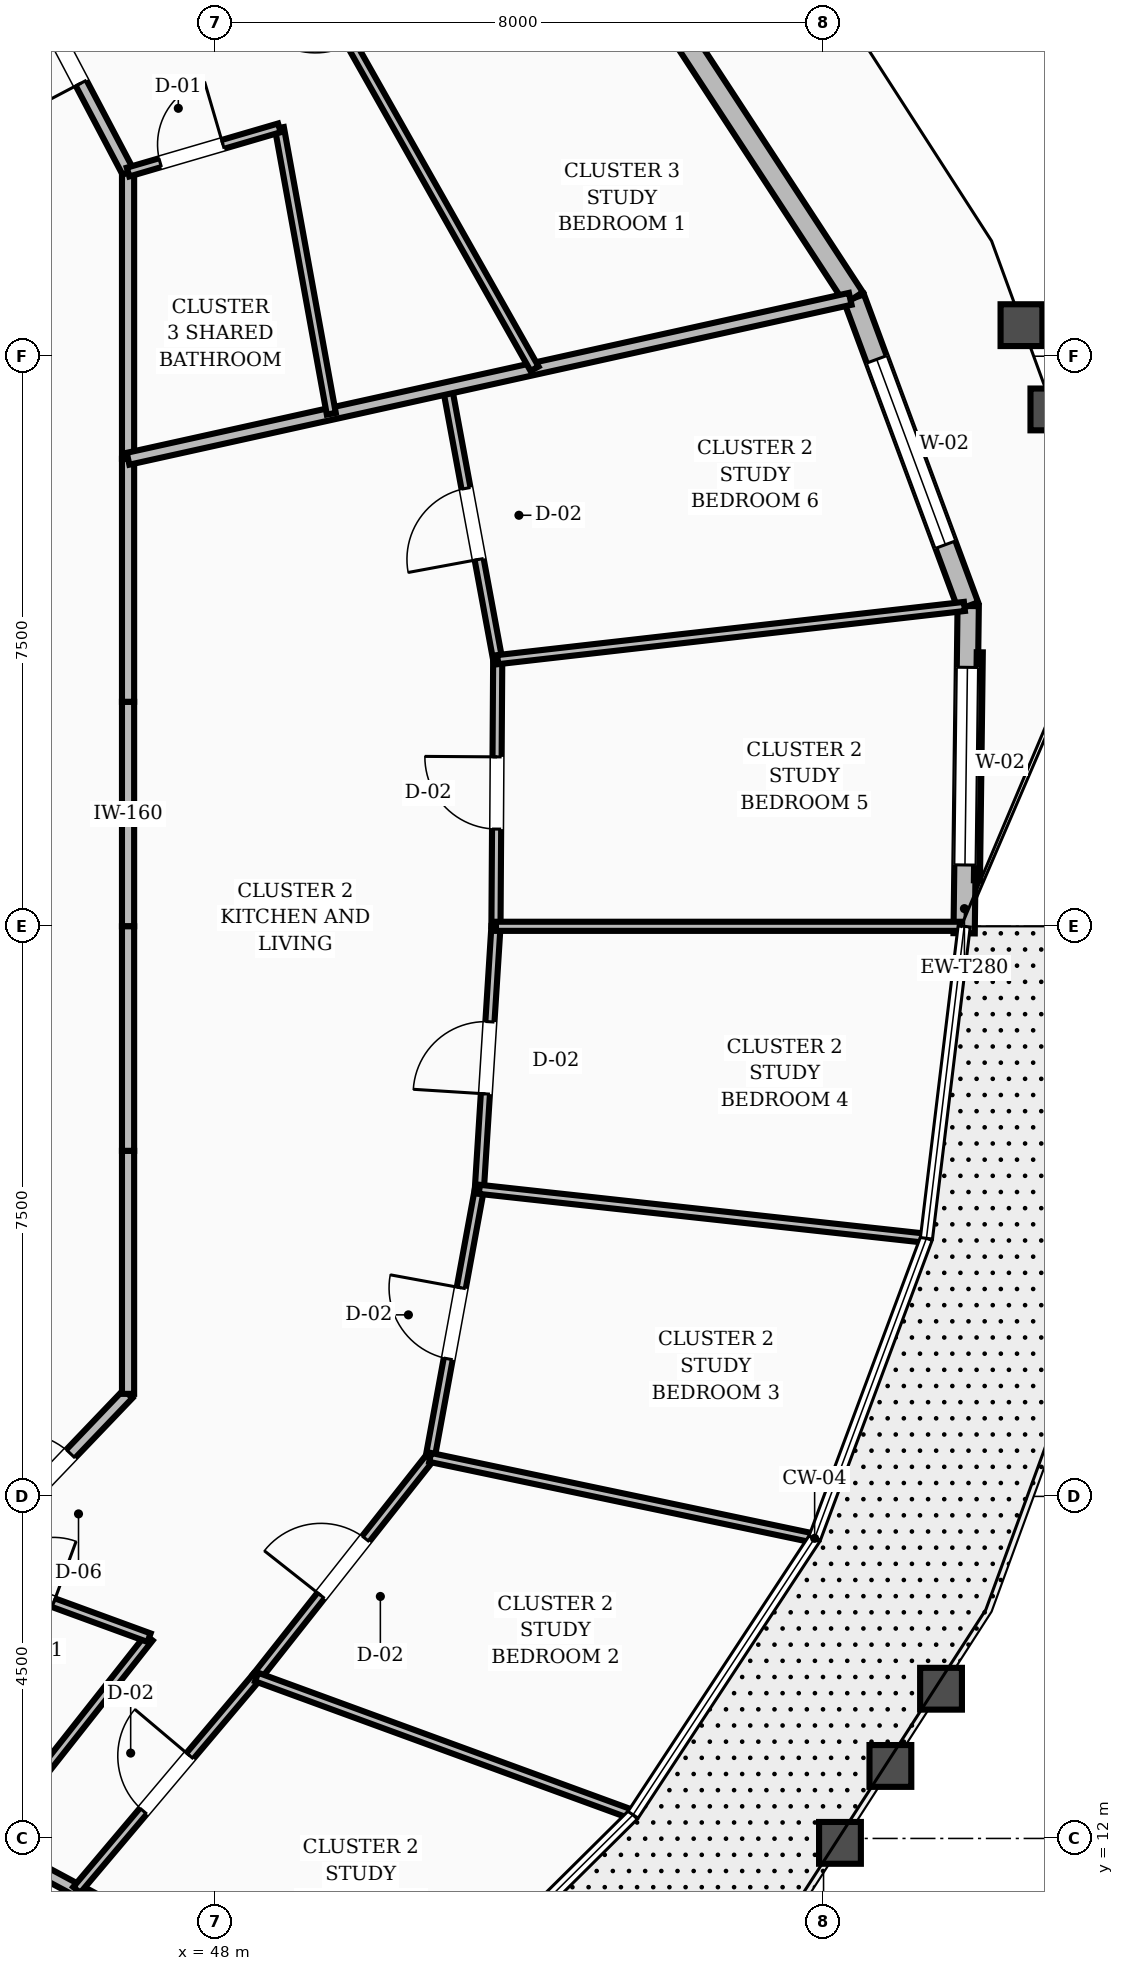
"""IFC4 building model, lengths in metres.
Left out: names, types, materials, properties, quantities, classifications, styles, units other than length and angle.
Written with IfcOpenShell. Run it as: python <this file> out.ifc"""

import sys

from ifc_helpers import new_model, si_unit, direction, frame, frame_2d, origin, place, context, subcontext, project, spatial, rectangle, extrude, element, fill, save


model = new_model("IFC4")
c1 = context("Model", 3, precision=1e-05, world=origin(), true_north=direction((0.0, 1.0)))
c2 = subcontext(c1, "Body", "Model", "MODEL_VIEW")
j1 = project(units=[si_unit("LENGTHUNIT", "METRE"), si_unit("PLANEANGLEUNIT", "RADIAN")], contexts=[c1])
p1 = place(None, origin())
s1 = spatial("IfcSite", under=j1, at=p1, CompositionType="ELEMENT")
p2 = place(p1, origin())
s2 = spatial("IfcBuilding", under=s1, at=p2, CompositionType="ELEMENT")
p3 = place(p2, frame((0.0, 0.0, 146.0)))
s3 = spatial("IfcBuildingStorey", under=s2, at=p3, CompositionType="ELEMENT", Elevation=146.0)
p4 = place(p3, frame((57.849, 23.908, 0.0), z_axis=(0.0, 0.0, 1.0), x_axis=(0.012472806403, 0.999922211525, 0.0)))
e1 = element("IfcWall", 1, at=p4, inside=s3, PredefinedType="STANDARD", context=c2, shape_type="SweptSolid", body=[
    extrude(rectangle(XDim=4.306, YDim=0.28, at=frame_2d((2.153, 0.0))), origin(), (0.0, 0.0, 1.0), 2.82),
])
p5 = place(p4, frame((0.899, 0.0, 0.8)))
e2 = element("IfcOpeningElement", 2, at=p5, cuts=e1, PredefinedType="OPENING", context=c2, shape_type="SweptSolid", body=[
    extrude(rectangle(XDim=2.6, YDim=1.65, at=frame_2d((1.3, 0.825))), frame((0.0, 0.15, 0.0), z_axis=(0.0, -1.0, 0.0), x_axis=(1.0, 0.0, 0.0)), (0.0, 0.0, 1.0), 0.3),
])
p6 = place(p3, frame((57.903, 28.214, 0.0), z_axis=(0.0, 0.0, 1.0), x_axis=(-0.347777987911, 0.937576914778, 0.0)))
e3 = element("IfcWall", 3, at=p6, inside=s3, PredefinedType="STANDARD", context=c2, shape_type="SweptSolid", body=[
    extrude(rectangle(XDim=4.322, YDim=0.28, at=frame_2d((2.161, 0.0))), origin(), (0.0, 0.0, 1.0), 2.82),
])
p7 = place(p6, frame((0.861, 0.0, 0.8)))
e4 = element("IfcOpeningElement", 4, at=p7, cuts=e3, PredefinedType="OPENING", context=c2, shape_type="SweptSolid", body=[
    extrude(rectangle(XDim=2.6, YDim=1.65, at=frame_2d((1.3, 0.825))), frame((0.0, 0.15, 0.0), z_axis=(0.0, -1.0, 0.0), x_axis=(1.0, 0.0, 0.0)), (0.0, 0.0, 1.0), 0.3),
])
p8 = place(p3, frame((56.4, 32.266, 0.0), z_axis=(0.0, 0.0, 1.0), x_axis=(-0.547087162156, 0.837075645927, 0.0)))
e5 = element("IfcWall", 5, at=p8, inside=s3, PredefinedType="STANDARD", context=c2, shape_type="SweptSolid", body=[
    extrude(rectangle(XDim=4.461, YDim=0.28, at=frame_2d((2.23, 0.0))), origin(), (0.0, 0.0, 1.0), 2.82),
])
p9 = place(p3, frame((46.85, 24.0, 0.0), z_axis=(0.0, 0.0, 1.0), x_axis=(0.0, 1.0, 0.0)))
e6 = element("IfcWall", 6, at=p9, inside=s3, PredefinedType="SOLIDWALL", context=c2, shape_type="SweptSolid", body=[
    extrude(rectangle(XDim=2.954, YDim=0.16, at=frame_2d((1.477, 0.0))), origin(), (0.0, 0.0, 1.0), 2.8),
])
p10 = place(p3, frame((46.85, 26.954, 0.0), z_axis=(0.0, 0.0, 1.0), x_axis=(0.0, 1.0, 0.0)))
e7 = element("IfcWall", 7, at=p10, inside=s3, PredefinedType="SOLIDWALL", context=c2, shape_type="SweptSolid", body=[
    extrude(rectangle(XDim=3.197, YDim=0.16, at=frame_2d((1.599, 0.0))), origin(), (0.0, 0.0, 1.0), 2.8),
])
p11 = place(p3, frame((46.85, 30.151, 0.0), z_axis=(0.0, 0.0, 1.0), x_axis=(0.0, 1.0, 0.0)))
e8 = element("IfcWall", 8, at=p11, inside=s3, PredefinedType="SOLIDWALL", context=c2, shape_type="SweptSolid", body=[
    extrude(rectangle(XDim=3.771, YDim=0.16, at=frame_2d((1.886, 0.0))), origin(), (0.0, 0.0, 1.0), 2.8),
])
p12 = place(p3, frame((46.85, 33.923, 0.0), z_axis=(0.0, 0.0, 1.0), x_axis=(-0.466093963429, 0.884735224378, 0.0)))
e9 = element("IfcWall", 9, at=p12, inside=s3, PredefinedType="SOLIDWALL", context=c2, shape_type="SweptSolid", body=[
    extrude(rectangle(XDim=3.648, YDim=0.16, at=frame_2d((1.824, 0.0))), origin(), (0.0, 0.0, 1.0), 2.8),
])
p13 = place(p12, frame((1.324, 0.0, 0.0)))
e10 = element("IfcOpeningElement", 10, at=p13, cuts=e9, PredefinedType="OPENING", context=c2, shape_type="SweptSolid", body=[
    extrude(rectangle(XDim=1.0, YDim=2.1, at=frame_2d((0.5, 1.05))), frame((0.0, 0.09, 0.0), z_axis=(0.0, -1.0, 0.0), x_axis=(1.0, 0.0, 0.0)), (0.0, 0.0, 1.0), 0.18),
])
p14 = place(p3, frame((44.65, 15.548, 0.0), z_axis=(0.0, 0.0, 1.0), x_axis=(0.691055487108, 0.722801711216, 0.0)))
e11 = element("IfcWall", 11, at=p14, inside=s3, PredefinedType="SOLIDWALL", context=c2, shape_type="SweptSolid", body=[
    extrude(rectangle(XDim=3.184, YDim=0.16, at=frame_2d((1.592, 0.0))), origin(), (0.0, 0.0, 1.0), 2.8),
])
p15 = place(p14, frame((1.092, 0.0, 0.0)))
e12 = element("IfcOpeningElement", 12, at=p15, cuts=e11, PredefinedType="OPENING", context=c2, shape_type="SweptSolid", body=[
    extrude(rectangle(XDim=1.0, YDim=2.1, at=frame_2d((0.5, 1.05))), frame((0.0, 0.09, 0.0), z_axis=(0.0, -1.0, 0.0), x_axis=(1.0, 0.0, 0.0)), (0.0, 0.0, 1.0), 0.18),
])
p16 = place(p3, frame((46.85, 17.849, 0.0), z_axis=(0.0, 0.0, 1.0), x_axis=(0.0, 1.0, 0.0)))
e13 = element("IfcWall", 13, at=p16, inside=s3, PredefinedType="SOLIDWALL", context=c2, shape_type="SweptSolid", body=[
    extrude(rectangle(XDim=3.197, YDim=0.16, at=frame_2d((1.599, 0.0))), origin(), (0.0, 0.0, 1.0), 2.8),
])
p17 = place(p3, frame((46.85, 21.046, 0.0), z_axis=(0.0, 0.0, 1.0), x_axis=(0.0, 1.0, 0.0)))
e14 = element("IfcWall", 14, at=p17, inside=s3, PredefinedType="SOLIDWALL", context=c2, shape_type="SweptSolid", body=[
    extrude(rectangle(XDim=2.954, YDim=0.16, at=frame_2d((1.477, 0.0))), origin(), (0.0, 0.0, 1.0), 2.8),
])
p18 = place(p3, frame((42.95, 13.05, 0.0), z_axis=(0.0, 0.0, 1.0), x_axis=(0.881439566777, -0.472296824169, 0.0)))
e15 = element("IfcWall", 15, at=p18, inside=s3, PredefinedType="SOLIDWALL", context=c2, shape_type="SweptSolid", body=[
    extrude(rectangle(XDim=8.265, YDim=0.16, at=frame_2d((4.133, 0.0))), origin(), (0.0, 0.0, 1.0), 2.8),
])
p19 = place(p3, frame((45.002, 11.95, 0.0), z_axis=(0.0, 0.0, 1.0), x_axis=(0.619575015098, 0.784937450162, 0.0)))
e16 = element("IfcWall", 16, at=p19, inside=s3, PredefinedType="PARTITIONING", context=c2, shape_type="SweptSolid", body=[
    extrude(rectangle(XDim=3.428, YDim=0.12, at=frame_2d((1.714, 0.0))), origin(), (0.0, 0.0, 1.0), 2.8),
])
p20 = place(p3, frame((44.65, 15.548, 0.0), z_axis=(0.0, 0.0, 1.0), x_axis=(0.93908860173, -0.343675134538, 0.0)))
e17 = element("IfcWall", 17, at=p20, inside=s3, PredefinedType="PARTITIONING", context=c2, shape_type="SweptSolid", body=[
    extrude(rectangle(XDim=2.637, YDim=0.12, at=frame_2d((1.318, 0.0))), origin(), (0.0, 0.0, 1.0), 2.8),
])
p21 = place(p20, frame((0.44, 0.0, 0.0)))
e18 = element("IfcOpeningElement", 18, at=p21, cuts=e17, PredefinedType="OPENING", context=c2, shape_type="SweptSolid", body=[
    extrude(rectangle(XDim=0.86, YDim=2.1, at=frame_2d((0.43, 1.05))), frame((0.0, 0.07, 0.0), z_axis=(0.0, -1.0, 0.0), x_axis=(1.0, 0.0, 0.0)), (0.0, 0.0, 1.0), 0.14),
])
p22 = place(p3, frame((46.175, 11.322, 0.0), z_axis=(0.0, 0.0, 1.0), x_axis=(0.645297395585, 0.763931457169, 0.0)))
e19 = element("IfcWall", 19, at=p22, inside=s3, PredefinedType="PARTITIONING", context=c2, shape_type="SweptSolid", body=[
    extrude(rectangle(XDim=3.667, YDim=0.12, at=frame_2d((1.833, 0.0))), origin(), (0.0, 0.0, 1.0), 2.8),
])
p23 = place(p22, frame((1.359, 0.0, 0.0)))
e20 = element("IfcOpeningElement", 20, at=p23, cuts=e19, PredefinedType="OPENING", context=c2, shape_type="SweptSolid", body=[
    extrude(rectangle(XDim=0.95, YDim=2.1, at=frame_2d((0.475, 1.05))), frame((0.0, 0.07, 0.0), z_axis=(0.0, -1.0, 0.0), x_axis=(1.0, 0.0, 0.0)), (0.0, 0.0, 1.0), 0.14),
])
p24 = place(p3, frame((48.541, 14.124, 0.0), z_axis=(0.0, 0.0, 1.0), x_axis=(0.620026847561, 0.784580593887, 0.0)))
e21 = element("IfcWall", 21, at=p24, inside=s3, PredefinedType="PARTITIONING", context=c2, shape_type="SweptSolid", body=[
    extrude(rectangle(XDim=3.682, YDim=0.12, at=frame_2d((1.841, 0.0))), origin(), (0.0, 0.0, 1.0), 2.8),
])
p25 = place(p24, frame((1.366, 0.0, 0.0)))
e22 = element("IfcOpeningElement", 22, at=p25, cuts=e21, PredefinedType="OPENING", context=c2, shape_type="SweptSolid", body=[
    extrude(rectangle(XDim=0.95, YDim=2.1, at=frame_2d((0.475, 1.05))), frame((0.0, 0.07, 0.0), z_axis=(0.0, -1.0, 0.0), x_axis=(1.0, 0.0, 0.0)), (0.0, 0.0, 1.0), 0.14),
])
p26 = place(p3, frame((48.541, 14.124, 0.0), z_axis=(0.0, 0.0, 1.0), x_axis=(0.939099678482, -0.343644865924, 0.0)))
e23 = element("IfcWall", 23, at=p26, inside=s3, PredefinedType="PARTITIONING", context=c2, shape_type="SweptSolid", body=[
    extrude(rectangle(XDim=5.224, YDim=0.12, at=frame_2d((2.612, 0.0))), origin(), (0.0, 0.0, 1.0), 2.8),
])
p27 = place(p3, frame((50.824, 17.013, 0.0), z_axis=(0.0, 0.0, 1.0), x_axis=(0.180484851733, 0.983577764234, 0.0)))
e24 = element("IfcWall", 24, at=p27, inside=s3, PredefinedType="PARTITIONING", context=c2, shape_type="SweptSolid", body=[
    extrude(rectangle(XDim=3.586, YDim=0.12, at=frame_2d((1.793, 0.0))), origin(), (0.0, 0.0, 1.0), 2.8),
])
p28 = place(p27, frame((1.318, 0.0, 0.0)))
e25 = element("IfcOpeningElement", 25, at=p28, cuts=e24, PredefinedType="OPENING", context=c2, shape_type="SweptSolid", body=[
    extrude(rectangle(XDim=0.95, YDim=2.1, at=frame_2d((0.475, 1.05))), frame((0.0, 0.07, 0.0), z_axis=(0.0, -1.0, 0.0), x_axis=(1.0, 0.0, 0.0)), (0.0, 0.0, 1.0), 0.14),
])
p29 = place(p3, frame((50.824, 17.013, 0.0), z_axis=(0.0, 0.0, 1.0), x_axis=(0.978584181815, -0.2058470284, 0.0)))
e26 = element("IfcWall", 26, at=p29, inside=s3, PredefinedType="PARTITIONING", context=c2, shape_type="SweptSolid", body=[
    extrude(rectangle(XDim=5.119, YDim=0.12, at=frame_2d((2.56, 0.0))), origin(), (0.0, 0.0, 1.0), 2.8),
])
p30 = place(p3, frame((51.472, 20.54, 0.0), z_axis=(0.0, 0.0, 1.0), x_axis=(0.063022706804, 0.998012093327, 0.0)))
e27 = element("IfcWall", 27, at=p30, inside=s3, PredefinedType="PARTITIONING", context=c2, shape_type="SweptSolid", body=[
    extrude(rectangle(XDim=3.467, YDim=0.12, at=frame_2d((1.733, 0.0))), origin(), (0.0, 0.0, 1.0), 2.8),
])
p31 = place(p30, frame((1.259, 0.0, 0.0)))
e28 = element("IfcOpeningElement", 28, at=p31, cuts=e27, PredefinedType="OPENING", context=c2, shape_type="SweptSolid", body=[
    extrude(rectangle(XDim=0.95, YDim=2.1, at=frame_2d((0.475, 1.05))), frame((0.0, 0.07, 0.0), z_axis=(0.0, -1.0, 0.0), x_axis=(1.0, 0.0, 0.0)), (0.0, 0.0, 1.0), 0.14),
])
p32 = place(p3, frame((51.472, 20.54, 0.0), z_axis=(0.0, 0.0, 1.0), x_axis=(0.994053548393, -0.10889234559, 0.0)))
e29 = element("IfcWall", 29, at=p32, inside=s3, PredefinedType="PARTITIONING", context=c2, shape_type="SweptSolid", body=[
    extrude(rectangle(XDim=5.867, YDim=0.12, at=frame_2d((2.934, 0.0))), origin(), (0.0, 0.0, 1.0), 2.8),
])
p33 = place(p3, frame((51.69, 24.0, 0.0), z_axis=(0.0, 0.0, 1.0), x_axis=(0.006610850666, 0.999978148088, 0.0)))
e30 = element("IfcWall", 30, at=p33, inside=s3, PredefinedType="PARTITIONING", context=c2, shape_type="SweptSolid", body=[
    extrude(rectangle(XDim=3.508, YDim=0.12, at=frame_2d((1.754, 0.0))), origin(), (0.0, 0.0, 1.0), 2.8),
])
p34 = place(p33, frame((1.279, 0.0, 0.0)))
e31 = element("IfcOpeningElement", 31, at=p34, cuts=e30, PredefinedType="OPENING", context=c2, shape_type="SweptSolid", body=[
    extrude(rectangle(XDim=0.95, YDim=2.1, at=frame_2d((0.475, 1.05))), frame((0.0, 0.07, 0.0), z_axis=(0.0, -1.0, 0.0), x_axis=(1.0, 0.0, 0.0)), (0.0, 0.0, 1.0), 0.14),
])
p35 = place(p3, frame((51.69, 24.0, 0.0), z_axis=(0.0, 0.0, 1.0), x_axis=(1.0, 0.0, 0.0)))
e32 = element("IfcWall", 32, at=p35, inside=s3, PredefinedType="PARTITIONING", context=c2, shape_type="SweptSolid", body=[
    extrude(rectangle(XDim=6.11, YDim=0.12, at=frame_2d((3.055, 0.0))), origin(), (0.0, 0.0, 1.0), 2.8),
])
p36 = place(p3, frame((51.713, 27.508, 0.0), z_axis=(0.0, 0.0, 1.0), x_axis=(-0.182000245683, 0.983298484984, 0.0)))
e33 = element("IfcWall", 33, at=p36, inside=s3, PredefinedType="PARTITIONING", context=c2, shape_type="SweptSolid", body=[
    extrude(rectangle(XDim=3.634, YDim=0.12, at=frame_2d((1.817, 0.0))), origin(), (0.0, 0.0, 1.0), 2.8),
])
p37 = place(p36, frame((1.342, 0.0, 0.0)))
e34 = element("IfcOpeningElement", 34, at=p37, cuts=e33, PredefinedType="OPENING", context=c2, shape_type="SweptSolid", body=[
    extrude(rectangle(XDim=0.95, YDim=2.1, at=frame_2d((0.475, 1.05))), frame((0.0, 0.07, 0.0), z_axis=(0.0, -1.0, 0.0), x_axis=(1.0, 0.0, 0.0)), (0.0, 0.0, 1.0), 0.14),
])
p38 = place(p3, frame((51.713, 27.508, 0.0), z_axis=(0.0, 0.0, 1.0), x_axis=(0.993569040849, 0.113227916461, 0.0)))
e35 = element("IfcWall", 35, at=p38, inside=s3, PredefinedType="PARTITIONING", context=c2, shape_type="SweptSolid", body=[
    extrude(rectangle(XDim=6.18, YDim=0.12, at=frame_2d((3.09, 0.0))), origin(), (0.0, 0.0, 1.0), 2.8),
])
p39 = place(p3, frame((46.85, 30.151, 0.0), z_axis=(0.0, 0.0, 1.0), x_axis=(0.976352651254, 0.216183950352, 0.0)))
e36 = element("IfcWall", 36, at=p39, inside=s3, PredefinedType="SOLIDWALL", context=c2, shape_type="SweptSolid", body=[
    extrude(rectangle(XDim=9.731, YDim=0.16, at=frame_2d((4.866, 0.0))), origin(), (0.0, 0.0, 1.0), 2.8),
])
p40 = place(p3, frame((49.524, 30.743, 0.0), z_axis=(0.0, 0.0, 1.0), x_axis=(-0.178705579988, 0.98390259461, 0.0)))
e37 = element("IfcWall", 37, at=p40, inside=s3, PredefinedType="PARTITIONING", context=c2, shape_type="SweptSolid", body=[
    extrude(rectangle(XDim=3.823, YDim=0.12, at=frame_2d((1.911, 0.0))), origin(), (0.0, 0.0, 1.0), 2.8),
])
p41 = place(p3, frame((46.85, 33.923, 0.0), z_axis=(0.0, 0.0, 1.0), x_axis=(0.959881252976, 0.280406811944, 0.0)))
e38 = element("IfcWall", 38, at=p41, inside=s3, PredefinedType="PARTITIONING", context=c2, shape_type="SweptSolid", body=[
    extrude(rectangle(XDim=2.074, YDim=0.12, at=frame_2d((1.037, 0.0))), origin(), (0.0, 0.0, 1.0), 2.8),
])
p42 = place(p41, frame((0.44, 0.0, 0.0)))
e39 = element("IfcOpeningElement", 39, at=p42, cuts=e38, PredefinedType="OPENING", context=c2, shape_type="SweptSolid", body=[
    extrude(rectangle(XDim=0.86, YDim=2.1, at=frame_2d((0.43, 1.05))), frame((0.0, 0.07, 0.0), z_axis=(0.0, -1.0, 0.0), x_axis=(1.0, 0.0, 0.0)), (0.0, 0.0, 1.0), 0.14),
])
p43 = place(p3, frame((52.198, 31.335, 0.0), z_axis=(0.0, 0.0, 1.0), x_axis=(-0.491634094676, 0.870801881574, 0.0)))
e40 = element("IfcWall", 40, at=p43, inside=s3, PredefinedType="PARTITIONING", context=c2, shape_type="SweptSolid", body=[
    extrude(rectangle(XDim=8.043, YDim=0.12, at=frame_2d((4.021, 0.0))), origin(), (0.0, 0.0, 1.0), 2.8),
])
p44 = place(p43, frame((4.913, 0.0, 0.0)))
e41 = element("IfcOpeningElement", 41, at=p44, cuts=e40, PredefinedType="OPENING", context=c2, shape_type="SweptSolid", body=[
    extrude(rectangle(XDim=0.95, YDim=2.1, at=frame_2d((0.475, 1.05))), frame((0.0, 0.07, 0.0), z_axis=(0.0, -1.0, 0.0), x_axis=(1.0, 0.0, 0.0)), (0.0, 0.0, 1.0), 0.14),
])
p45 = place(p5, origin())
e42 = element("IfcWindow", 42, at=p45, inside=s3, PartitioningType="SINGLE_PANEL", PredefinedType="WINDOW", context=c2, shape_type="SweptSolid", body=[
    extrude(rectangle(XDim=2.6, YDim=1.65, at=frame_2d((1.3, 0.825))), frame((0.0, 0.03, 0.0), z_axis=(0.0, -1.0, 0.0), x_axis=(1.0, 0.0, 0.0)), (0.0, 0.0, 1.0), 0.06),
])
fill(e2, e42)
p46 = place(p7, origin())
e43 = element("IfcWindow", 43, at=p46, inside=s3, PartitioningType="SINGLE_PANEL", PredefinedType="WINDOW", context=c2, shape_type="SweptSolid", body=[
    extrude(rectangle(XDim=2.6, YDim=1.65, at=frame_2d((1.3, 0.825))), frame((0.0, 0.03, 0.0), z_axis=(0.0, -1.0, 0.0), x_axis=(1.0, 0.0, 0.0)), (0.0, 0.0, 1.0), 0.06),
])
fill(e4, e43)
p47 = place(p21, origin())
e44 = element("IfcDoor", 44, at=p47, inside=s3, OperationType="SINGLE_SWING_RIGHT", PredefinedType="DOOR", context=c2, shape_type="SweptSolid", body=[
    extrude(rectangle(XDim=0.86, YDim=2.1, at=frame_2d((0.43, 1.05))), frame((0.0, 0.025, 0.0), z_axis=(0.0, -1.0, 0.0), x_axis=(1.0, 0.0, 0.0)), (0.0, 0.0, 1.0), 0.05),
])
fill(e18, e44)
p48 = place(p15, origin())
e45 = element("IfcDoor", 45, at=p48, inside=s3, OperationType="SINGLE_SWING_LEFT", PredefinedType="DOOR", context=c2, shape_type="SweptSolid", body=[
    extrude(rectangle(XDim=1.0, YDim=2.1, at=frame_2d((0.5, 1.05))), frame((0.0, 0.025, 0.0), z_axis=(0.0, -1.0, 0.0), x_axis=(1.0, 0.0, 0.0)), (0.0, 0.0, 1.0), 0.05),
])
fill(e12, e45)
p49 = place(p23, origin())
e46 = element("IfcDoor", 46, at=p49, inside=s3, OperationType="SINGLE_SWING_RIGHT", PredefinedType="DOOR", context=c2, shape_type="SweptSolid", body=[
    extrude(rectangle(XDim=0.95, YDim=2.1, at=frame_2d((0.475, 1.05))), frame((0.0, 0.025, 0.0), z_axis=(0.0, -1.0, 0.0), x_axis=(1.0, 0.0, 0.0)), (0.0, 0.0, 1.0), 0.05),
])
fill(e20, e46)
p50 = place(p25, origin())
e47 = element("IfcDoor", 47, at=p50, inside=s3, OperationType="SINGLE_SWING_LEFT", PredefinedType="DOOR", context=c2, shape_type="SweptSolid", body=[
    extrude(rectangle(XDim=0.95, YDim=2.1, at=frame_2d((0.475, 1.05))), frame((0.0, 0.025, 0.0), z_axis=(0.0, -1.0, 0.0), x_axis=(1.0, 0.0, 0.0)), (0.0, 0.0, 1.0), 0.05),
])
fill(e22, e47)
p51 = place(p28, origin())
e48 = element("IfcDoor", 48, at=p51, inside=s3, OperationType="SINGLE_SWING_RIGHT", PredefinedType="DOOR", context=c2, shape_type="SweptSolid", body=[
    extrude(rectangle(XDim=0.95, YDim=2.1, at=frame_2d((0.475, 1.05))), frame((0.0, 0.025, 0.0), z_axis=(0.0, -1.0, 0.0), x_axis=(1.0, 0.0, 0.0)), (0.0, 0.0, 1.0), 0.05),
])
fill(e25, e48)
p52 = place(p31, origin())
e49 = element("IfcDoor", 49, at=p52, inside=s3, OperationType="SINGLE_SWING_LEFT", PredefinedType="DOOR", context=c2, shape_type="SweptSolid", body=[
    extrude(rectangle(XDim=0.95, YDim=2.1, at=frame_2d((0.475, 1.05))), frame((0.0, 0.025, 0.0), z_axis=(0.0, -1.0, 0.0), x_axis=(1.0, 0.0, 0.0)), (0.0, 0.0, 1.0), 0.05),
])
fill(e28, e49)
p53 = place(p34, origin())
e50 = element("IfcDoor", 50, at=p53, inside=s3, OperationType="SINGLE_SWING_RIGHT", PredefinedType="DOOR", context=c2, shape_type="SweptSolid", body=[
    extrude(rectangle(XDim=0.95, YDim=2.1, at=frame_2d((0.475, 1.05))), frame((0.0, 0.025, 0.0), z_axis=(0.0, -1.0, 0.0), x_axis=(1.0, 0.0, 0.0)), (0.0, 0.0, 1.0), 0.05),
])
fill(e31, e50)
p54 = place(p37, origin())
e51 = element("IfcDoor", 51, at=p54, inside=s3, OperationType="SINGLE_SWING_LEFT", PredefinedType="DOOR", context=c2, shape_type="SweptSolid", body=[
    extrude(rectangle(XDim=0.95, YDim=2.1, at=frame_2d((0.475, 1.05))), frame((0.0, 0.025, 0.0), z_axis=(0.0, -1.0, 0.0), x_axis=(1.0, 0.0, 0.0)), (0.0, 0.0, 1.0), 0.05),
])
fill(e34, e51)
p55 = place(p42, origin())
e52 = element("IfcDoor", 52, at=p55, inside=s3, OperationType="SINGLE_SWING_RIGHT", PredefinedType="DOOR", context=c2, shape_type="SweptSolid", body=[
    extrude(rectangle(XDim=0.86, YDim=2.1, at=frame_2d((0.43, 1.05))), frame((0.0, 0.025, 0.0), z_axis=(0.0, -1.0, 0.0), x_axis=(1.0, 0.0, 0.0)), (0.0, 0.0, 1.0), 0.05),
])
fill(e39, e52)
p56 = place(p13, origin())
e53 = element("IfcDoor", 53, at=p56, inside=s3, OperationType="SINGLE_SWING_LEFT", PredefinedType="DOOR", context=c2, shape_type="SweptSolid", body=[
    extrude(rectangle(XDim=1.0, YDim=2.1, at=frame_2d((0.5, 1.05))), frame((0.0, 0.025, 0.0), z_axis=(0.0, -1.0, 0.0), x_axis=(1.0, 0.0, 0.0)), (0.0, 0.0, 1.0), 0.05),
])
fill(e10, e53)
save(model, sys.argv[1])
